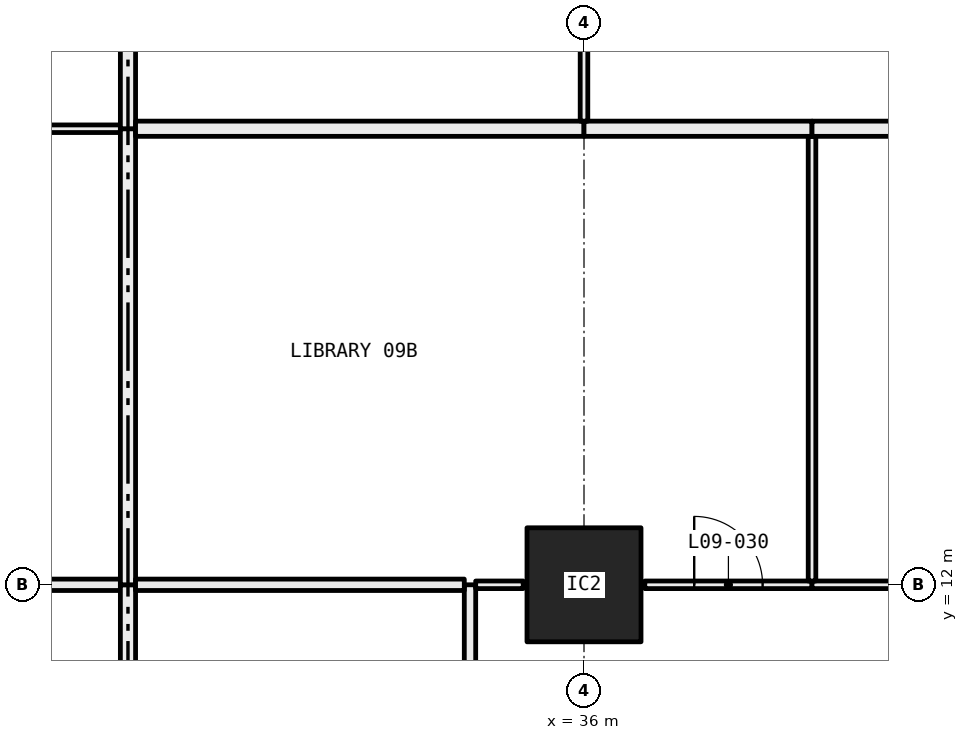
"""IFC4 building model, lengths in metres.
Left out: names, types, materials, properties, quantities, classifications, styles, units other than length and angle.
Written with IfcOpenShell. Run it as: python <this file> out.ifc"""

import sys

from ifc_helpers import new_model, si_unit, direction, frame, frame_2d, origin, origin_2d, place, context, subcontext, project, spatial, rectangle, hollow_rectangle, extrude, element, fill, save


model = new_model("IFC4")
c1 = context("Model", 3, precision=1e-05, world=origin(), true_north=direction((0.0, 1.0)))
c2 = subcontext(c1, "Body", "Model", "MODEL_VIEW")
j1 = project(units=[si_unit("LENGTHUNIT", "METRE"), si_unit("PLANEANGLEUNIT", "RADIAN")], contexts=[c1])
p1 = place(None, origin())
s1 = spatial("IfcSite", under=j1, at=p1, CompositionType="ELEMENT")
p2 = place(p1, origin())
s2 = spatial("IfcBuilding", under=s1, at=p2, CompositionType="ELEMENT")
p3 = place(p2, frame((0.0, 0.0, 43.8)))
s3 = spatial("IfcBuildingStorey", under=s2, at=p3, CompositionType="ELEMENT", Elevation=43.8)
p4 = place(p3, frame((36.0, 12.0, 0.0), z_axis=(0.0, 0.0, 1.0), x_axis=(1.0, 0.0, 0.0)))
e1 = element("IfcColumn", 1, at=p4, inside=s3, PredefinedType="COLUMN", context=c2, shape_type="SweptSolid", body=[
    extrude(hollow_rectangle(XDim=1.5, YDim=1.5, WallThickness=0.065, at=origin_2d()), origin(), (0.0, 0.0, 1.0), 3.05),
])
p5 = place(p3, frame((29.9, 12.0, 0.0), z_axis=(0.0, 0.0, 1.0), x_axis=(-1.0, 0.0, 0.0)))
e2 = element("IfcWall", 2, at=p5, inside=s3, PredefinedType="PARTITIONING", context=c2, shape_type="SweptSolid", body=[
    extrude(rectangle(XDim=4.325, YDim=0.15, at=frame_2d((2.163, 0.0))), origin(), (0.0, 0.0, 1.0), 2.45),
])
p6 = place(p3, frame((30.0, 9.0, 0.0), z_axis=(0.0, 0.0, 1.0), x_axis=(0.0, 1.0, 0.0)))
e3 = element("IfcWall", 3, at=p6, inside=s3, PredefinedType="PARTITIONING", context=c2, shape_type="SweptSolid", body=[
    extrude(rectangle(XDim=3.0, YDim=0.2, at=frame_2d((1.5, 0.0))), origin(), (0.0, 0.0, 1.0), 2.45),
])
p7 = place(p3, frame((29.9, 18.0, 0.0), z_axis=(0.0, 0.0, 1.0), x_axis=(-1.0, 0.0, 0.0)))
e4 = element("IfcWall", 4, at=p7, inside=s3, PredefinedType="PARTITIONING", context=c2, shape_type="SweptSolid", body=[
    extrude(rectangle(XDim=3.9, YDim=0.1, at=frame_2d((1.95, 0.0))), origin(), (0.0, 0.0, 1.0), 3.05),
])
p8 = place(p7, frame((1.5, 0.0, 0.0)))
e5 = element("IfcOpeningElement", 5, at=p8, cuts=e4, PredefinedType="OPENING", context=c2, shape_type="SweptSolid", body=[
    extrude(rectangle(XDim=0.9, YDim=2.1, at=frame_2d((0.45, 1.05))), frame((0.0, 0.06, 0.0), z_axis=(0.0, -1.0, 0.0), x_axis=(1.0, 0.0, 0.0)), (0.0, 0.0, 1.0), 0.12),
])
p9 = place(p3, frame((30.0, 12.0, 0.0), z_axis=(0.0, 0.0, 1.0), x_axis=(0.0, 1.0, 0.0)))
e6 = element("IfcWall", 6, at=p9, inside=s3, PredefinedType="PARTITIONING", context=c2, shape_type="SweptSolid", body=[
    extrude(rectangle(XDim=6.0, YDim=0.2, at=frame_2d((3.0, 0.0))), origin(), (0.0, 0.0, 1.0), 2.45),
])
p10 = place(p3, frame((30.0, 18.0, 0.0), z_axis=(0.0, 0.0, 1.0), x_axis=(0.0, 1.0, 0.0)))
e7 = element("IfcWall", 7, at=p10, inside=s3, PredefinedType="PARTITIONING", context=c2, shape_type="SweptSolid", body=[
    extrude(rectangle(XDim=6.3, YDim=0.2, at=frame_2d((3.15, 0.0))), origin(), (0.0, 0.0, 1.0), 2.45),
])
p11 = place(p3, frame((34.5, 9.075, 0.0), z_axis=(0.0, 0.0, 1.0), x_axis=(0.0, 1.0, 0.0)))
e8 = element("IfcWall", 8, at=p11, inside=s3, PredefinedType="PARTITIONING", context=c2, shape_type="SweptSolid", body=[
    extrude(rectangle(XDim=2.925, YDim=0.15, at=frame_2d((1.462, 0.0))), origin(), (0.0, 0.0, 1.0), 2.45),
])
p12 = place(p11, frame((1.012, 0.0, 0.0)))
e9 = element("IfcOpeningElement", 9, at=p12, cuts=e8, PredefinedType="OPENING", context=c2, shape_type="SweptSolid", body=[
    extrude(rectangle(XDim=0.9, YDim=2.1, at=frame_2d((0.45, 1.05))), frame((0.0, 0.085, 0.0), z_axis=(0.0, -1.0, 0.0), x_axis=(1.0, 0.0, 0.0)), (0.0, 0.0, 1.0), 0.17),
])
p13 = place(p3, frame((34.425, 12.0, 0.0), z_axis=(0.0, 0.0, 1.0), x_axis=(-1.0, 0.0, 0.0)))
e10 = element("IfcWall", 10, at=p13, inside=s3, PredefinedType="PARTITIONING", context=c2, shape_type="SweptSolid", body=[
    extrude(rectangle(XDim=4.325, YDim=0.15, at=frame_2d((2.163, 0.0))), origin(), (0.0, 0.0, 1.0), 2.45),
])
p14 = place(p3, frame((35.2, 12.0, 0.0), z_axis=(0.0, 0.0, 1.0), x_axis=(-1.0, 0.0, 0.0)))
e11 = element("IfcWall", 11, at=p14, inside=s3, PredefinedType="PARTITIONING", context=c2, shape_type="SweptSolid", body=[
    extrude(rectangle(XDim=0.625, YDim=0.1, at=frame_2d((0.312, 0.0))), origin(), (0.0, 0.0, 1.0), 2.45),
])
p15 = place(p3, frame((39.0, 12.0, 0.0), z_axis=(0.0, 0.0, 1.0), x_axis=(-1.0, 0.0, 0.0)))
e12 = element("IfcWall", 12, at=p15, inside=s3, PredefinedType="PARTITIONING", context=c2, shape_type="SweptSolid", body=[
    extrude(rectangle(XDim=2.2, YDim=0.1, at=frame_2d((1.1, 0.0))), origin(), (0.0, 0.0, 1.0), 2.45),
])
p16 = place(p15, frame((0.65, 0.0, 0.0)))
e13 = element("IfcOpeningElement", 13, at=p16, cuts=e12, PredefinedType="OPENING", context=c2, shape_type="SweptSolid", body=[
    extrude(rectangle(XDim=0.9, YDim=2.1, at=frame_2d((0.45, 1.05))), frame((0.0, 0.06, 0.0), z_axis=(0.0, -1.0, 0.0), x_axis=(1.0, 0.0, 0.0)), (0.0, 0.0, 1.0), 0.12),
])
p17 = place(p3, frame((42.325, 12.0, 0.0), z_axis=(0.0, 0.0, 1.0), x_axis=(-1.0, 0.0, 0.0)))
e14 = element("IfcWall", 14, at=p17, inside=s3, PredefinedType="PARTITIONING", context=c2, shape_type="SweptSolid", body=[
    extrude(rectangle(XDim=3.325, YDim=0.1, at=frame_2d((1.663, 0.0))), origin(), (0.0, 0.0, 1.0), 2.45),
])
p18 = place(p17, frame((1.212, 0.0, 0.0)))
e15 = element("IfcOpeningElement", 15, at=p18, cuts=e14, PredefinedType="OPENING", context=c2, shape_type="SweptSolid", body=[
    extrude(rectangle(XDim=0.9, YDim=2.1, at=frame_2d((0.45, 1.05))), frame((0.0, 0.06, 0.0), z_axis=(0.0, -1.0, 0.0), x_axis=(1.0, 0.0, 0.0)), (0.0, 0.0, 1.0), 0.12),
])
p19 = place(p3, frame((39.0, 12.05, 0.0), z_axis=(0.0, 0.0, 1.0), x_axis=(0.0, 1.0, 0.0)))
e16 = element("IfcWall", 16, at=p19, inside=s3, PredefinedType="PARTITIONING", context=c2, shape_type="SweptSolid", body=[
    extrude(rectangle(XDim=5.85, YDim=0.1, at=frame_2d((2.925, 0.0))), origin(), (0.0, 0.0, 1.0), 2.45),
])
p20 = place(p3, frame((36.0, 18.0, 0.0), z_axis=(0.0, 0.0, 1.0), x_axis=(-1.0, 0.0, 0.0)))
e17 = element("IfcWall", 17, at=p20, inside=s3, PredefinedType="PARTITIONING", context=c2, shape_type="SweptSolid", body=[
    extrude(rectangle(XDim=5.9, YDim=0.2, at=frame_2d((2.95, 0.0))), origin(), (0.0, 0.0, 1.0), 2.45),
])
p21 = place(p3, frame((39.0, 18.0, 0.0), z_axis=(0.0, 0.0, 1.0), x_axis=(-1.0, 0.0, 0.0)))
e18 = element("IfcWall", 18, at=p21, inside=s3, PredefinedType="PARTITIONING", context=c2, shape_type="SweptSolid", body=[
    extrude(rectangle(XDim=3.0, YDim=0.2, at=frame_2d((1.5, 0.0))), origin(), (0.0, 0.0, 1.0), 2.45),
])
p22 = place(p3, frame((43.5, 18.0, 0.0), z_axis=(0.0, 0.0, 1.0), x_axis=(-1.0, 0.0, 0.0)))
e19 = element("IfcWall", 19, at=p22, inside=s3, PredefinedType="PARTITIONING", context=c2, shape_type="SweptSolid", body=[
    extrude(rectangle(XDim=4.5, YDim=0.2, at=frame_2d((2.25, 0.0))), origin(), (0.0, 0.0, 1.0), 3.05),
])
p23 = place(p3, frame((36.0, 18.1, 0.0), z_axis=(0.0, 0.0, 1.0), x_axis=(0.0, 1.0, 0.0)))
e20 = element("IfcWall", 20, at=p23, inside=s3, PredefinedType="PARTITIONING", context=c2, shape_type="SweptSolid", body=[
    extrude(rectangle(XDim=5.1, YDim=0.1, at=frame_2d((2.55, 0.0))), origin(), (0.0, 0.0, 1.0), 2.45),
])
p24 = place(p23, frame((2.1, 0.0, 0.0)))
e21 = element("IfcOpeningElement", 21, at=p24, cuts=e20, PredefinedType="OPENING", context=c2, shape_type="SweptSolid", body=[
    extrude(rectangle(XDim=0.9, YDim=2.1, at=frame_2d((0.45, 1.05))), frame((0.0, 0.06, 0.0), z_axis=(0.0, -1.0, 0.0), x_axis=(1.0, 0.0, 0.0)), (0.0, 0.0, 1.0), 0.12),
])
p25 = place(p16, frame((0.9, 0.0, 0.0), x_axis=(-1.0, 0.0, 0.0)))
e22 = element("IfcDoor", 22, at=p25, inside=s3, OperationType="SINGLE_SWING_RIGHT", PredefinedType="DOOR", context=c2, shape_type="SweptSolid", body=[
    extrude(rectangle(XDim=0.9, YDim=2.1, at=frame_2d((0.45, 1.05))), frame((0.0, 0.025, 0.0), z_axis=(0.0, -1.0, 0.0), x_axis=(1.0, 0.0, 0.0)), (0.0, 0.0, 1.0), 0.05),
])
fill(e13, e22)
save(model, sys.argv[1])
